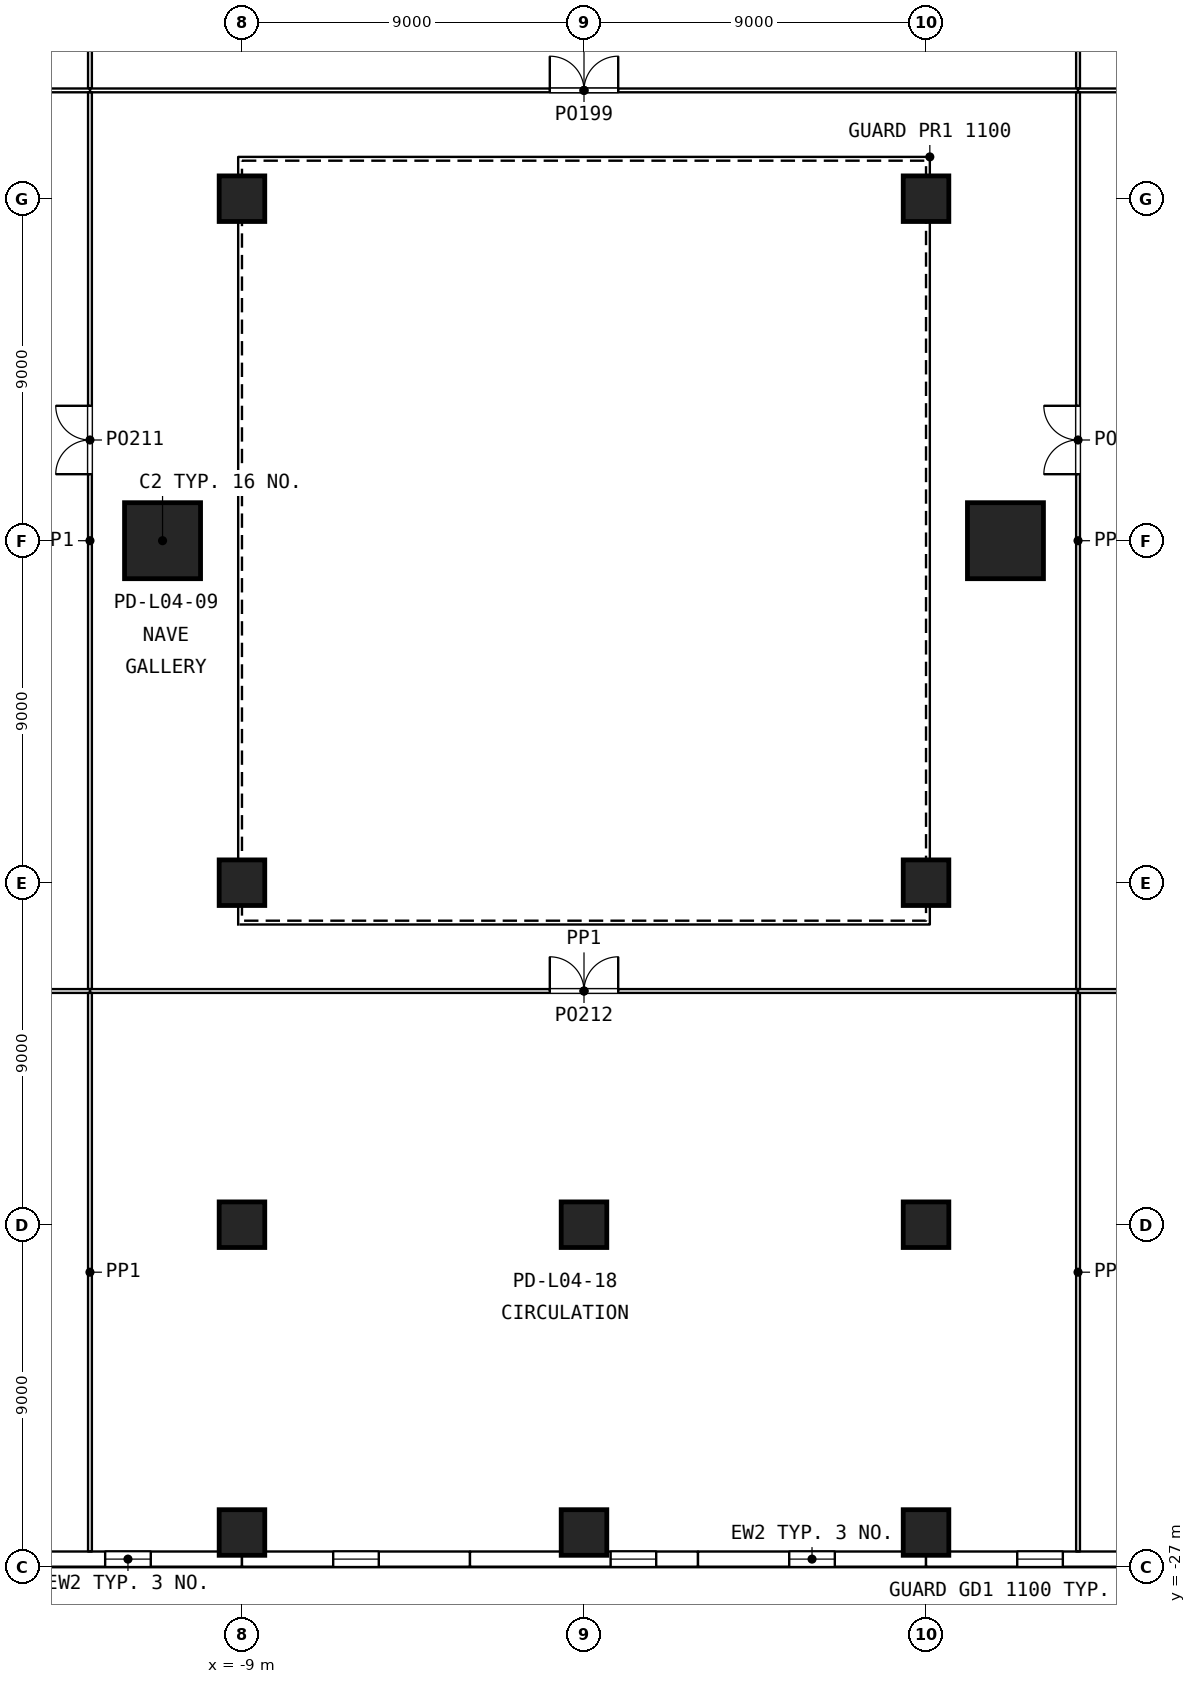
"""IFC4 building model, lengths in metres.
Left out: names, types, materials, properties, quantities, classifications, styles, units other than length and angle.
Written with IfcOpenShell. Run it as: python <this file> out.ifc"""

import sys

from ifc_helpers import new_model, si_unit, direction, frame, frame_2d, origin, origin_2d, place, context, subcontext, project, spatial, rectangle, extrude, element, fill, save


model = new_model("IFC4")
c1 = context("Model", 3, precision=1e-05, world=origin(), true_north=direction((0.0, 1.0)))
c2 = subcontext(c1, "Body", "Model", "MODEL_VIEW")
j1 = project(units=[si_unit("LENGTHUNIT", "METRE"), si_unit("PLANEANGLEUNIT", "RADIAN")], contexts=[c1])
p1 = place(None, origin())
s1 = spatial("IfcSite", under=j1, at=p1, CompositionType="ELEMENT")
p2 = place(p1, origin())
s2 = spatial("IfcBuilding", under=s1, at=p2, CompositionType="ELEMENT")
p3 = place(p2, frame((0.0, 0.0, 22.8)))
s3 = spatial("IfcBuildingStorey", under=s2, at=p3, CompositionType="ELEMENT", Elevation=22.8)
for number, where, z_axis, x_axis in (
    (1, (-9.0, -26.1, 0.0), (0.0, 0.0, 1.0), (1.0, 0.0, 0.0)),
    (2, (-9.0, -18.0, 0.0), (0.0, 0.0, 1.0), (1.0, 0.0, 0.0)),
    (3, (-9.0, -9.0, 0.0), (0.0, 0.0, 1.0), (1.0, 0.0, 0.0)),
    (4, (-9.0, 9.0, 0.0), (0.0, 0.0, 1.0), (1.0, 0.0, 0.0)),
    (5, (0.0, -26.1, 0.0), (0.0, 0.0, 1.0), (1.0, 0.0, 0.0)),
    (6, (0.0, -18.0, 0.0), (0.0, 0.0, 1.0), (1.0, 0.0, 0.0)),
    (7, (9.0, -26.1, 0.0), (0.0, 0.0, 1.0), (1.0, 0.0, 0.0)),
    (8, (9.0, -18.0, 0.0), (0.0, 0.0, 1.0), (1.0, 0.0, 0.0)),
    (9, (9.0, -9.0, 0.0), (0.0, 0.0, 1.0), (1.0, 0.0, 0.0)),
    (10, (9.0, 9.0, 0.0), (0.0, 0.0, 1.0), (1.0, 0.0, 0.0)),
):
    element("IfcColumn", number, at=place(p3, frame(where, z_axis=z_axis, x_axis=x_axis)), inside=s3, PredefinedType="COLUMN", context=c2, shape_type="SweptSolid", body=[
        extrude(rectangle(XDim=1.2, YDim=1.2, at=origin_2d()), origin(), (0.0, 0.0, 1.0), 4.8),
    ])
for number, where, z_axis, x_axis in (
    (11, (-11.09, 0.0, 0.0), (0.0, 0.0, 1.0), (1.0, 0.0, 0.0)),
    (12, (11.09, 0.0, 0.0), (0.0, 0.0, 1.0), (-1.0, 0.0, 0.0)),
):
    element("IfcColumn", number, at=place(p3, frame(where, z_axis=z_axis, x_axis=x_axis)), inside=s3, PredefinedType="COLUMN", context=c2, shape_type="SweptSolid", body=[
        extrude(rectangle(XDim=2.0, YDim=2.0, at=origin_2d()), origin(), (0.0, 0.0, 1.0), 4.8),
    ])
p4 = place(p3, frame((-15.0, -26.8, 0.0), z_axis=(0.0, 0.0, 1.0), x_axis=(1.0, 0.0, 0.0)))
e13 = element("IfcWall", 13, at=p4, inside=s3, PredefinedType="SOLIDWALL", context=c2, shape_type="SweptSolid", body=[
    extrude(rectangle(XDim=6.0, YDim=0.4, at=frame_2d((3.0, 0.0))), origin(), (0.0, 0.0, 1.0), 4.5),
])
p5 = place(p4, frame((2.4, 0.0, 1.1)))
e14 = element("IfcOpeningElement", 14, at=p5, cuts=e13, PredefinedType="OPENING", context=c2, shape_type="SweptSolid", body=[
    extrude(rectangle(XDim=1.2, YDim=1.8, at=frame_2d((0.6, 0.9))), frame((0.0, 0.21, 0.0), z_axis=(0.0, -1.0, 0.0), x_axis=(1.0, 0.0, 0.0)), (0.0, 0.0, 1.0), 0.42),
])
p6 = place(p3, frame((-9.0, -26.8, 0.0), z_axis=(0.0, 0.0, 1.0), x_axis=(1.0, 0.0, 0.0)))
e15 = element("IfcWall", 15, at=p6, inside=s3, PredefinedType="SOLIDWALL", context=c2, shape_type="SweptSolid", body=[
    extrude(rectangle(XDim=6.0, YDim=0.4, at=frame_2d((3.0, 0.0))), origin(), (0.0, 0.0, 1.0), 4.5),
])
p7 = place(p6, frame((2.4, 0.0, 1.1)))
e16 = element("IfcOpeningElement", 16, at=p7, cuts=e15, PredefinedType="OPENING", context=c2, shape_type="SweptSolid", body=[
    extrude(rectangle(XDim=1.2, YDim=1.8, at=frame_2d((0.6, 0.9))), frame((0.0, 0.21, 0.0), z_axis=(0.0, -1.0, 0.0), x_axis=(1.0, 0.0, 0.0)), (0.0, 0.0, 1.0), 0.42),
])
p8 = place(p3, frame((-3.0, -26.8, 0.0), z_axis=(0.0, 0.0, 1.0), x_axis=(1.0, 0.0, 0.0)))
e17 = element("IfcWall", 17, at=p8, inside=s3, PredefinedType="SOLIDWALL", context=c2, shape_type="SweptSolid", body=[
    extrude(rectangle(XDim=6.0, YDim=0.4, at=frame_2d((3.0, 0.0))), origin(), (0.0, 0.0, 1.0), 4.5),
])
p9 = place(p8, frame((3.7, 0.0, 1.1)))
e18 = element("IfcOpeningElement", 18, at=p9, cuts=e17, PredefinedType="OPENING", context=c2, shape_type="SweptSolid", body=[
    extrude(rectangle(XDim=1.2, YDim=1.8, at=frame_2d((0.6, 0.9))), frame((0.0, 0.21, 0.0), z_axis=(0.0, -1.0, 0.0), x_axis=(1.0, 0.0, 0.0)), (0.0, 0.0, 1.0), 0.42),
])
p10 = place(p3, frame((3.0, -26.8, 0.0), z_axis=(0.0, 0.0, 1.0), x_axis=(1.0, 0.0, 0.0)))
e19 = element("IfcWall", 19, at=p10, inside=s3, PredefinedType="SOLIDWALL", context=c2, shape_type="SweptSolid", body=[
    extrude(rectangle(XDim=6.0, YDim=0.4, at=frame_2d((3.0, 0.0))), origin(), (0.0, 0.0, 1.0), 4.5),
])
p11 = place(p10, frame((2.4, 0.0, 1.1)))
e20 = element("IfcOpeningElement", 20, at=p11, cuts=e19, PredefinedType="OPENING", context=c2, shape_type="SweptSolid", body=[
    extrude(rectangle(XDim=1.2, YDim=1.8, at=frame_2d((0.6, 0.9))), frame((0.0, 0.21, 0.0), z_axis=(0.0, -1.0, 0.0), x_axis=(1.0, 0.0, 0.0)), (0.0, 0.0, 1.0), 0.42),
])
p12 = place(p3, frame((9.0, -26.8, 0.0), z_axis=(0.0, 0.0, 1.0), x_axis=(1.0, 0.0, 0.0)))
e21 = element("IfcWall", 21, at=p12, inside=s3, PredefinedType="SOLIDWALL", context=c2, shape_type="SweptSolid", body=[
    extrude(rectangle(XDim=6.0, YDim=0.4, at=frame_2d((3.0, 0.0))), origin(), (0.0, 0.0, 1.0), 4.5),
])
p13 = place(p12, frame((2.4, 0.0, 1.1)))
e22 = element("IfcOpeningElement", 22, at=p13, cuts=e21, PredefinedType="OPENING", context=c2, shape_type="SweptSolid", body=[
    extrude(rectangle(XDim=1.2, YDim=1.8, at=frame_2d((0.6, 0.9))), frame((0.0, 0.21, 0.0), z_axis=(0.0, -1.0, 0.0), x_axis=(1.0, 0.0, 0.0)), (0.0, 0.0, 1.0), 0.42),
])
p14 = place(p3, frame((-13.0, 11.9, 0.0), z_axis=(0.0, 0.0, 1.0), x_axis=(0.0, 1.0, 0.0)))
e23 = element("IfcWall", 23, at=p14, inside=s3, PredefinedType="PARTITIONING", context=c2, shape_type="SweptSolid", body=[
    extrude(rectangle(XDim=14.7, YDim=0.1, at=frame_2d((7.35, 0.0))), origin(), (0.0, 0.0, 1.0), 4.5),
])
p15 = place(p14, frame((6.85, 0.0, 0.0)))
e24 = element("IfcOpeningElement", 24, at=p15, cuts=e23, PredefinedType="OPENING", context=c2, shape_type="SweptSolid", body=[
    extrude(rectangle(XDim=1.0, YDim=2.1, at=frame_2d((0.5, 1.05))), frame((0.0, 0.06, 0.0), z_axis=(0.0, -1.0, 0.0), x_axis=(1.0, 0.0, 0.0)), (0.0, 0.0, 1.0), 0.12),
])
p16 = place(p3, frame((13.0, 11.9, 0.0), z_axis=(0.0, 0.0, 1.0), x_axis=(0.0, 1.0, 0.0)))
e25 = element("IfcWall", 25, at=p16, inside=s3, PredefinedType="PARTITIONING", context=c2, shape_type="SweptSolid", body=[
    extrude(rectangle(XDim=14.7, YDim=0.1, at=frame_2d((7.35, 0.0))), origin(), (0.0, 0.0, 1.0), 4.5),
])
p17 = place(p16, frame((6.45, 0.0, 0.0)))
e26 = element("IfcOpeningElement", 26, at=p17, cuts=e25, PredefinedType="OPENING", context=c2, shape_type="SweptSolid", body=[
    extrude(rectangle(XDim=1.8, YDim=2.1, at=frame_2d((0.9, 1.05))), frame((0.0, 0.06, 0.0), z_axis=(0.0, -1.0, 0.0), x_axis=(1.0, 0.0, 0.0)), (0.0, 0.0, 1.0), 0.12),
])
p18 = place(p3, frame((-13.0, 11.85, 0.0), z_axis=(0.0, 0.0, 1.0), x_axis=(1.0, 0.0, 0.0)))
e27 = element("IfcWall", 27, at=p18, inside=s3, PredefinedType="PARTITIONING", context=c2, shape_type="SweptSolid", body=[
    extrude(rectangle(XDim=26.0, YDim=0.1, at=frame_2d((13.0, 0.0))), origin(), (0.0, 0.0, 1.0), 4.5),
])
p19 = place(p18, frame((12.1, 0.0, 0.0)))
e28 = element("IfcOpeningElement", 28, at=p19, cuts=e27, PredefinedType="OPENING", context=c2, shape_type="SweptSolid", body=[
    extrude(rectangle(XDim=1.8, YDim=2.1, at=frame_2d((0.9, 1.05))), frame((0.0, 0.06, 0.0), z_axis=(0.0, -1.0, 0.0), x_axis=(1.0, 0.0, 0.0)), (0.0, 0.0, 1.0), 0.12),
])
p20 = place(p3, frame((-36.0, 11.85, 0.0), z_axis=(0.0, 0.0, 1.0), x_axis=(1.0, 0.0, 0.0)))
e29 = element("IfcWall", 29, at=p20, inside=s3, PredefinedType="PARTITIONING", context=c2, shape_type="SweptSolid", body=[
    extrude(rectangle(XDim=23.0, YDim=0.1, at=frame_2d((11.5, 0.0))), origin(), (0.0, 0.0, 1.0), 4.5),
])
p21 = place(p3, frame((13.0, 11.85, 0.0), z_axis=(0.0, 0.0, 1.0), x_axis=(1.0, 0.0, 0.0)))
e30 = element("IfcWall", 30, at=p21, inside=s3, PredefinedType="PARTITIONING", context=c2, shape_type="SweptSolid", body=[
    extrude(rectangle(XDim=21.415, YDim=0.1, at=frame_2d((10.708, 0.0))), origin(), (0.0, 0.0, 1.0), 4.5),
])
p22 = place(p3, frame((-13.0, -11.8, 0.0), z_axis=(0.0, 0.0, 1.0), x_axis=(0.0, 1.0, 0.0)))
e31 = element("IfcWall", 31, at=p22, inside=s3, PredefinedType="PARTITIONING", context=c2, shape_type="SweptSolid", body=[
    extrude(rectangle(XDim=23.6, YDim=0.1, at=frame_2d((11.8, 0.0))), origin(), (0.0, 0.0, 1.0), 4.5),
])
p23 = place(p22, frame((13.55, 0.0, 0.0)))
e32 = element("IfcOpeningElement", 32, at=p23, cuts=e31, PredefinedType="OPENING", context=c2, shape_type="SweptSolid", body=[
    extrude(rectangle(XDim=1.8, YDim=2.1, at=frame_2d((0.9, 1.05))), frame((0.0, 0.06, 0.0), z_axis=(0.0, -1.0, 0.0), x_axis=(1.0, 0.0, 0.0)), (0.0, 0.0, 1.0), 0.12),
])
p24 = place(p3, frame((-13.0, -11.85, 0.0), z_axis=(0.0, 0.0, 1.0), x_axis=(1.0, 0.0, 0.0)))
e33 = element("IfcWall", 33, at=p24, inside=s3, PredefinedType="PARTITIONING", context=c2, shape_type="SweptSolid", body=[
    extrude(rectangle(XDim=26.0, YDim=0.1, at=frame_2d((13.0, 0.0))), origin(), (0.0, 0.0, 1.0), 4.5),
])
p25 = place(p24, frame((12.1, 0.0, 0.0)))
e34 = element("IfcOpeningElement", 34, at=p25, cuts=e33, PredefinedType="OPENING", context=c2, shape_type="SweptSolid", body=[
    extrude(rectangle(XDim=1.8, YDim=2.1, at=frame_2d((0.9, 1.05))), frame((0.0, 0.06, 0.0), z_axis=(0.0, -1.0, 0.0), x_axis=(1.0, 0.0, 0.0)), (0.0, 0.0, 1.0), 0.12),
])
p26 = place(p3, frame((13.0, -11.8, 0.0), z_axis=(0.0, 0.0, 1.0), x_axis=(0.0, 1.0, 0.0)))
e35 = element("IfcWall", 35, at=p26, inside=s3, PredefinedType="PARTITIONING", context=c2, shape_type="SweptSolid", body=[
    extrude(rectangle(XDim=23.6, YDim=0.1, at=frame_2d((11.8, 0.0))), origin(), (0.0, 0.0, 1.0), 4.5),
])
p27 = place(p26, frame((13.55, 0.0, 0.0)))
e36 = element("IfcOpeningElement", 36, at=p27, cuts=e35, PredefinedType="OPENING", context=c2, shape_type="SweptSolid", body=[
    extrude(rectangle(XDim=1.8, YDim=2.1, at=frame_2d((0.9, 1.05))), frame((0.0, 0.06, 0.0), z_axis=(0.0, -1.0, 0.0), x_axis=(1.0, 0.0, 0.0)), (0.0, 0.0, 1.0), 0.12),
])
p28 = place(p3, frame((-62.6, -11.85, 0.0), z_axis=(0.0, 0.0, 1.0), x_axis=(1.0, 0.0, 0.0)))
e37 = element("IfcWall", 37, at=p28, inside=s3, PredefinedType="PARTITIONING", context=c2, shape_type="SweptSolid", body=[
    extrude(rectangle(XDim=49.6, YDim=0.1, at=frame_2d((24.8, 0.0))), origin(), (0.0, 0.0, 1.0), 4.5),
])
p29 = place(p28, frame((23.9, 0.0, 0.0)))
e38 = element("IfcOpeningElement", 38, at=p29, cuts=e37, PredefinedType="OPENING", context=c2, shape_type="SweptSolid", body=[
    extrude(rectangle(XDim=1.8, YDim=2.1, at=frame_2d((0.9, 1.05))), frame((0.0, 0.06, 0.0), z_axis=(0.0, -1.0, 0.0), x_axis=(1.0, 0.0, 0.0)), (0.0, 0.0, 1.0), 0.12),
])
for number, where, z_axis, x_axis in (
    (39, (-13.0, -26.6, 0.0), (0.0, 0.0, 1.0), (0.0, 1.0, 0.0)),
    (40, (13.0, -26.6, 0.0), (0.0, 0.0, 1.0), (0.0, 1.0, 0.0)),
):
    element("IfcWall", number, at=place(p3, frame(where, z_axis=z_axis, x_axis=x_axis)), inside=s3, PredefinedType="PARTITIONING", context=c2, shape_type="SweptSolid", body=[
        extrude(rectangle(XDim=14.7, YDim=0.1, at=frame_2d((7.35, 0.0))), origin(), (0.0, 0.0, 1.0), 4.5),
    ])
p30 = place(p3, frame((13.0, -11.85, 0.0), z_axis=(0.0, 0.0, 1.0), x_axis=(1.0, 0.0, 0.0)))
e41 = element("IfcWall", 41, at=p30, inside=s3, PredefinedType="PARTITIONING", context=c2, shape_type="SweptSolid", body=[
    extrude(rectangle(XDim=21.415, YDim=0.1, at=frame_2d((10.708, 0.0))), origin(), (0.0, 0.0, 1.0), 4.5),
])
p31 = place(p30, frame((9.958, 0.0, 0.0)))
e42 = element("IfcOpeningElement", 42, at=p31, cuts=e41, PredefinedType="OPENING", context=c2, shape_type="SweptSolid", body=[
    extrude(rectangle(XDim=1.5, YDim=2.1, at=frame_2d((0.75, 1.05))), frame((0.0, 0.06, 0.0), z_axis=(0.0, -1.0, 0.0), x_axis=(1.0, 0.0, 0.0)), (0.0, 0.0, 1.0), 0.12),
])
p32 = place(p5, origin())
e43 = element("IfcWindow", 43, at=p32, inside=s3, PartitioningType="SINGLE_PANEL", PredefinedType="WINDOW", context=c2, shape_type="SweptSolid", body=[
    extrude(rectangle(XDim=1.2, YDim=1.8, at=frame_2d((0.6, 0.9))), frame((0.0, 0.03, 0.0), z_axis=(0.0, -1.0, 0.0), x_axis=(1.0, 0.0, 0.0)), (0.0, 0.0, 1.0), 0.06),
])
fill(e14, e43)
p33 = place(p7, origin())
e44 = element("IfcWindow", 44, at=p33, inside=s3, PartitioningType="SINGLE_PANEL", PredefinedType="WINDOW", context=c2, shape_type="SweptSolid", body=[
    extrude(rectangle(XDim=1.2, YDim=1.8, at=frame_2d((0.6, 0.9))), frame((0.0, 0.03, 0.0), z_axis=(0.0, -1.0, 0.0), x_axis=(1.0, 0.0, 0.0)), (0.0, 0.0, 1.0), 0.06),
])
fill(e16, e44)
p34 = place(p9, origin())
e45 = element("IfcWindow", 45, at=p34, inside=s3, PartitioningType="SINGLE_PANEL", PredefinedType="WINDOW", context=c2, shape_type="SweptSolid", body=[
    extrude(rectangle(XDim=1.2, YDim=1.8, at=frame_2d((0.6, 0.9))), frame((0.0, 0.03, 0.0), z_axis=(0.0, -1.0, 0.0), x_axis=(1.0, 0.0, 0.0)), (0.0, 0.0, 1.0), 0.06),
])
fill(e18, e45)
p35 = place(p11, origin())
e46 = element("IfcWindow", 46, at=p35, inside=s3, PartitioningType="SINGLE_PANEL", PredefinedType="WINDOW", context=c2, shape_type="SweptSolid", body=[
    extrude(rectangle(XDim=1.2, YDim=1.8, at=frame_2d((0.6, 0.9))), frame((0.0, 0.03, 0.0), z_axis=(0.0, -1.0, 0.0), x_axis=(1.0, 0.0, 0.0)), (0.0, 0.0, 1.0), 0.06),
])
fill(e20, e46)
p36 = place(p13, origin())
e47 = element("IfcWindow", 47, at=p36, inside=s3, PartitioningType="SINGLE_PANEL", PredefinedType="WINDOW", context=c2, shape_type="SweptSolid", body=[
    extrude(rectangle(XDim=1.2, YDim=1.8, at=frame_2d((0.6, 0.9))), frame((0.0, 0.03, 0.0), z_axis=(0.0, -1.0, 0.0), x_axis=(1.0, 0.0, 0.0)), (0.0, 0.0, 1.0), 0.06),
])
fill(e22, e47)
p37 = place(p19, origin())
e48 = element("IfcDoor", 48, at=p37, inside=s3, OperationType="DOUBLE_DOOR_DOUBLE_SWING", PredefinedType="DOOR", context=c2, shape_type="SweptSolid", body=[
    extrude(rectangle(XDim=1.8, YDim=2.1, at=frame_2d((0.9, 1.05))), frame((0.0, 0.025, 0.0), z_axis=(0.0, -1.0, 0.0), x_axis=(1.0, 0.0, 0.0)), (0.0, 0.0, 1.0), 0.05),
])
fill(e28, e48)
p38 = place(p23, origin())
e49 = element("IfcDoor", 49, at=p38, inside=s3, OperationType="DOUBLE_DOOR_DOUBLE_SWING", PredefinedType="DOOR", context=c2, shape_type="SweptSolid", body=[
    extrude(rectangle(XDim=1.8, YDim=2.1, at=frame_2d((0.9, 1.05))), frame((0.0, 0.025, 0.0), z_axis=(0.0, -1.0, 0.0), x_axis=(1.0, 0.0, 0.0)), (0.0, 0.0, 1.0), 0.05),
])
fill(e32, e49)
p39 = place(p25, origin())
e50 = element("IfcDoor", 50, at=p39, inside=s3, OperationType="DOUBLE_DOOR_DOUBLE_SWING", PredefinedType="DOOR", context=c2, shape_type="SweptSolid", body=[
    extrude(rectangle(XDim=1.8, YDim=2.1, at=frame_2d((0.9, 1.05))), frame((0.0, 0.025, 0.0), z_axis=(0.0, -1.0, 0.0), x_axis=(1.0, 0.0, 0.0)), (0.0, 0.0, 1.0), 0.05),
])
fill(e34, e50)
p40 = place(p27, origin())
e51 = element("IfcDoor", 51, at=p40, inside=s3, OperationType="DOUBLE_DOOR_DOUBLE_SWING", PredefinedType="DOOR", context=c2, shape_type="SweptSolid", body=[
    extrude(rectangle(XDim=1.8, YDim=2.1, at=frame_2d((0.9, 1.05))), frame((0.0, 0.025, 0.0), z_axis=(0.0, -1.0, 0.0), x_axis=(1.0, 0.0, 0.0)), (0.0, 0.0, 1.0), 0.05),
])
fill(e36, e51)
save(model, sys.argv[1])
